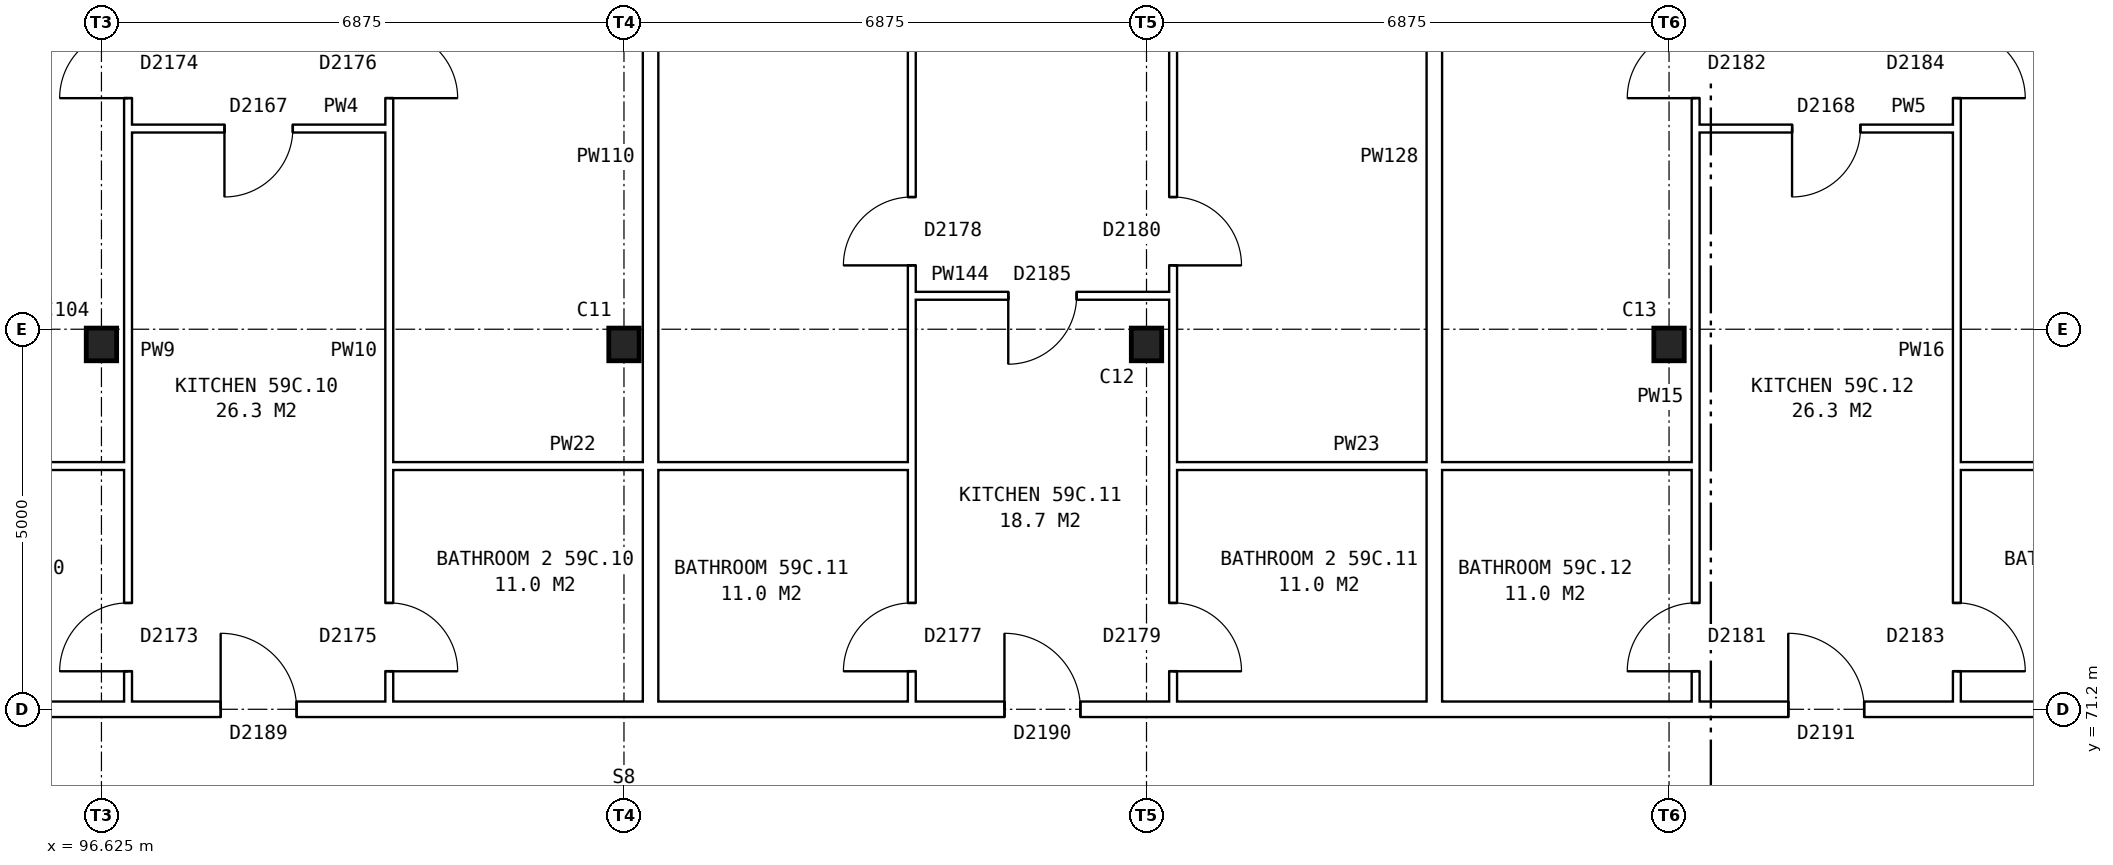
"""IFC4 building model, lengths in metres.
Left out: names, types, materials, properties, quantities, classifications, styles, units other than length and angle.
Written with IfcOpenShell. Run it as: python <this file> out.ifc"""

import sys

from ifc_helpers import new_model, si_unit, direction, frame, frame_2d, origin, origin_2d, place, context, subcontext, project, spatial, rectangle, i_section, extrude, element, fill, save


model = new_model("IFC4")
c1 = context("Model", 3, precision=1e-05, world=origin(), true_north=direction((0.0, 1.0)))
c2 = subcontext(c1, "Body", "Model", "MODEL_VIEW")
j1 = project(units=[si_unit("LENGTHUNIT", "METRE"), si_unit("PLANEANGLEUNIT", "RADIAN")], contexts=[c1])
p1 = place(None, origin())
s1 = spatial("IfcSite", under=j1, at=p1, CompositionType="ELEMENT")
p2 = place(p1, origin())
s2 = spatial("IfcBuilding", under=s1, at=p2, CompositionType="ELEMENT")
p3 = place(p2, frame((0.0, 0.0, 209.0)))
s3 = spatial("IfcBuildingStorey", under=s2, at=p3, CompositionType="ELEMENT", Elevation=209.0)
for number, where, z_axis, x_axis in (
    (1, (96.625, 76.0, 0.0), (0.0, 0.0, 1.0), (1.0, 0.0, 0.0)),
    (2, (103.5, 76.0, 0.0), (0.0, 0.0, 1.0), (1.0, 0.0, 0.0)),
    (3, (110.375, 76.0, 0.0), (0.0, 0.0, 1.0), (1.0, 0.0, 0.0)),
    (4, (117.25, 76.0, 0.0), (0.0, 0.0, 1.0), (1.0, 0.0, 0.0)),
):
    element("IfcColumn", number, at=place(p3, frame(where, z_axis=z_axis, x_axis=x_axis)), inside=s3, PredefinedType="COLUMN", context=c2, shape_type="SweptSolid", body=[
        extrude(i_section(OverallWidth=0.4, OverallDepth=0.43, WebThickness=0.04, FlangeThickness=0.04, at=origin_2d()), origin(), (0.0, 0.0, 1.0), 2.85),
    ])
p4 = place(p3, frame((83.225, 71.2, 0.0), z_axis=(0.0, 0.0, 1.0), x_axis=(1.0, 0.0, 0.0)))
e5 = element("IfcWall", 5, at=p4, inside=s3, PredefinedType="PARTITIONING", context=c2, shape_type="SweptSolid", body=[
    extrude(rectangle(XDim=41.25, YDim=0.2, at=frame_2d((20.625, 0.0))), origin(), (0.0, 0.0, 1.0), 2.85),
])
p5 = place(p4, frame((4.656, 0.0, 0.0)))
e6 = element("IfcOpeningElement", 6, at=p5, cuts=e5, PredefinedType="OPENING", context=c2, shape_type="SweptSolid", body=[
    extrude(rectangle(XDim=1.0, YDim=2.1, at=frame_2d((0.5, 1.05))), frame((0.0, 0.11, 0.0), z_axis=(0.0, -1.0, 0.0), x_axis=(1.0, 0.0, 0.0)), (0.0, 0.0, 1.0), 0.22),
])
p6 = place(p4, frame((14.969, 0.0, 0.0)))
e7 = element("IfcOpeningElement", 7, at=p6, cuts=e5, PredefinedType="OPENING", context=c2, shape_type="SweptSolid", body=[
    extrude(rectangle(XDim=1.0, YDim=2.1, at=frame_2d((0.5, 1.05))), frame((0.0, 0.11, 0.0), z_axis=(0.0, -1.0, 0.0), x_axis=(1.0, 0.0, 0.0)), (0.0, 0.0, 1.0), 0.22),
])
p7 = place(p4, frame((25.281, 0.0, 0.0)))
e8 = element("IfcOpeningElement", 8, at=p7, cuts=e5, PredefinedType="OPENING", context=c2, shape_type="SweptSolid", body=[
    extrude(rectangle(XDim=1.0, YDim=2.1, at=frame_2d((0.5, 1.05))), frame((0.0, 0.11, 0.0), z_axis=(0.0, -1.0, 0.0), x_axis=(1.0, 0.0, 0.0)), (0.0, 0.0, 1.0), 0.22),
])
p8 = place(p4, frame((35.594, 0.0, 0.0)))
e9 = element("IfcOpeningElement", 9, at=p8, cuts=e5, PredefinedType="OPENING", context=c2, shape_type="SweptSolid", body=[
    extrude(rectangle(XDim=1.0, YDim=2.1, at=frame_2d((0.5, 1.05))), frame((0.0, 0.11, 0.0), z_axis=(0.0, -1.0, 0.0), x_axis=(1.0, 0.0, 0.0)), (0.0, 0.0, 1.0), 0.22),
])
for number, where, z_axis, x_axis in (
    (10, (90.1, 74.4, 0.0), (0.0, 0.0, 1.0), (1.0, 0.0, 0.0)),
    (11, (100.412, 74.4, 0.0), (0.0, 0.0, 1.0), (1.0, 0.0, 0.0)),
    (12, (110.725, 74.4, 0.0), (0.0, 0.0, 1.0), (1.0, 0.0, 0.0)),
):
    element("IfcWall", number, at=place(p3, frame(where, z_axis=z_axis, x_axis=x_axis)), inside=s3, PredefinedType="PARTITIONING", context=c2, shape_type="SweptSolid", body=[
        extrude(rectangle(XDim=6.875, YDim=0.1, at=frame_2d((3.438, 0.0))), origin(), (0.0, 0.0, 1.0), 2.85),
    ])
p9 = place(p3, frame((121.037, 74.4, 0.0), z_axis=(0.0, 0.0, 1.0), x_axis=(1.0, 0.0, 0.0)))
e13 = element("IfcWall", 13, at=p9, inside=s3, PredefinedType="PARTITIONING", context=c2, shape_type="SweptSolid", body=[
    extrude(rectangle(XDim=3.338, YDim=0.1, at=frame_2d((1.669, 0.0))), origin(), (0.0, 0.0, 1.0), 2.85),
])
p10 = place(p3, frame((107.287, 76.64, 0.0), z_axis=(0.0, 0.0, 1.0), x_axis=(1.0, 0.0, 0.0)))
e14 = element("IfcWall", 14, at=p10, inside=s3, PredefinedType="PARTITIONING", context=c2, shape_type="SweptSolid", body=[
    extrude(rectangle(XDim=3.438, YDim=0.1, at=frame_2d((1.719, 0.0))), origin(), (0.0, 0.0, 1.0), 2.85),
])
p11 = place(p10, frame((1.269, 0.0, 0.0)))
e15 = element("IfcOpeningElement", 15, at=p11, cuts=e14, PredefinedType="OPENING", context=c2, shape_type="SweptSolid", body=[
    extrude(rectangle(XDim=0.9, YDim=2.1, at=frame_2d((0.45, 1.05))), frame((0.0, 0.06, 0.0), z_axis=(0.0, -1.0, 0.0), x_axis=(1.0, 0.0, 0.0)), (0.0, 0.0, 1.0), 0.12),
])
p12 = place(p3, frame((96.975, 78.84, 0.0), z_axis=(0.0, 0.0, 1.0), x_axis=(1.0, 0.0, 0.0)))
e16 = element("IfcWall", 16, at=p12, inside=s3, PredefinedType="PARTITIONING", context=c2, shape_type="SweptSolid", body=[
    extrude(rectangle(XDim=3.437, YDim=0.1, at=frame_2d((1.719, 0.0))), origin(), (0.0, 0.0, 1.0), 2.85),
])
p13 = place(p12, frame((1.269, 0.0, 0.0)))
e17 = element("IfcOpeningElement", 17, at=p13, cuts=e16, PredefinedType="OPENING", context=c2, shape_type="SweptSolid", body=[
    extrude(rectangle(XDim=0.9, YDim=2.1, at=frame_2d((0.45, 1.05))), frame((0.0, 0.06, 0.0), z_axis=(0.0, -1.0, 0.0), x_axis=(1.0, 0.0, 0.0)), (0.0, 0.0, 1.0), 0.12),
])
p14 = place(p3, frame((117.6, 78.84, 0.0), z_axis=(0.0, 0.0, 1.0), x_axis=(1.0, 0.0, 0.0)))
e18 = element("IfcWall", 18, at=p14, inside=s3, PredefinedType="PARTITIONING", context=c2, shape_type="SweptSolid", body=[
    extrude(rectangle(XDim=3.437, YDim=0.1, at=frame_2d((1.719, 0.0))), origin(), (0.0, 0.0, 1.0), 2.85),
])
p15 = place(p14, frame((1.269, 0.0, 0.0)))
e19 = element("IfcOpeningElement", 19, at=p15, cuts=e18, PredefinedType="OPENING", context=c2, shape_type="SweptSolid", body=[
    extrude(rectangle(XDim=0.9, YDim=2.1, at=frame_2d((0.45, 1.05))), frame((0.0, 0.06, 0.0), z_axis=(0.0, -1.0, 0.0), x_axis=(1.0, 0.0, 0.0)), (0.0, 0.0, 1.0), 0.12),
])
p16 = place(p3, frame((96.975, 71.3, 0.0), z_axis=(0.0, 0.0, 1.0), x_axis=(0.0, 1.0, 0.0)))
e20 = element("IfcWall", 20, at=p16, inside=s3, PredefinedType="PARTITIONING", context=c2, shape_type="SweptSolid", body=[
    extrude(rectangle(XDim=14.34, YDim=0.1, at=frame_2d((7.17, 0.0))), origin(), (0.0, 0.0, 1.0), 2.85),
])
p17 = place(p16, frame((7.94, 0.0, 0.0)))
e21 = element("IfcOpeningElement", 21, at=p17, cuts=e20, PredefinedType="OPENING", context=c2, shape_type="SweptSolid", body=[
    extrude(rectangle(XDim=0.9, YDim=2.1, at=frame_2d((0.45, 1.05))), frame((0.0, 0.06, 0.0), z_axis=(0.0, -1.0, 0.0), x_axis=(1.0, 0.0, 0.0)), (0.0, 0.0, 1.0), 0.12),
])
p18 = place(p16, frame((0.4, 0.0, 0.0)))
e22 = element("IfcOpeningElement", 22, at=p18, cuts=e20, PredefinedType="OPENING", context=c2, shape_type="SweptSolid", body=[
    extrude(rectangle(XDim=0.9, YDim=2.1, at=frame_2d((0.45, 1.05))), frame((0.0, 0.06, 0.0), z_axis=(0.0, -1.0, 0.0), x_axis=(1.0, 0.0, 0.0)), (0.0, 0.0, 1.0), 0.12),
])
p19 = place(p3, frame((100.412, 71.3, 0.0), z_axis=(0.0, 0.0, 1.0), x_axis=(0.0, 1.0, 0.0)))
e23 = element("IfcWall", 23, at=p19, inside=s3, PredefinedType="PARTITIONING", context=c2, shape_type="SweptSolid", body=[
    extrude(rectangle(XDim=14.34, YDim=0.1, at=frame_2d((7.17, 0.0))), origin(), (0.0, 0.0, 1.0), 2.85),
])
p20 = place(p19, frame((7.94, 0.0, 0.0)))
e24 = element("IfcOpeningElement", 24, at=p20, cuts=e23, PredefinedType="OPENING", context=c2, shape_type="SweptSolid", body=[
    extrude(rectangle(XDim=0.9, YDim=2.1, at=frame_2d((0.45, 1.05))), frame((0.0, 0.06, 0.0), z_axis=(0.0, -1.0, 0.0), x_axis=(1.0, 0.0, 0.0)), (0.0, 0.0, 1.0), 0.12),
])
p21 = place(p19, frame((0.4, 0.0, 0.0)))
e25 = element("IfcOpeningElement", 25, at=p21, cuts=e23, PredefinedType="OPENING", context=c2, shape_type="SweptSolid", body=[
    extrude(rectangle(XDim=0.9, YDim=2.1, at=frame_2d((0.45, 1.05))), frame((0.0, 0.06, 0.0), z_axis=(0.0, -1.0, 0.0), x_axis=(1.0, 0.0, 0.0)), (0.0, 0.0, 1.0), 0.12),
])
p22 = place(p3, frame((103.85, 71.3, 0.0), z_axis=(0.0, 0.0, 1.0), x_axis=(0.0, 1.0, 0.0)))
e26 = element("IfcWall", 26, at=p22, inside=s3, PredefinedType="PARTITIONING", context=c2, shape_type="SweptSolid", body=[
    extrude(rectangle(XDim=14.34, YDim=0.2, at=frame_2d((7.17, 0.0))), origin(), (0.0, 0.0, 1.0), 2.85),
])
p23 = place(p3, frame((107.287, 71.3, 0.0), z_axis=(0.0, 0.0, 1.0), x_axis=(0.0, 1.0, 0.0)))
e27 = element("IfcWall", 27, at=p23, inside=s3, PredefinedType="PARTITIONING", context=c2, shape_type="SweptSolid", body=[
    extrude(rectangle(XDim=14.34, YDim=0.1, at=frame_2d((7.17, 0.0))), origin(), (0.0, 0.0, 1.0), 2.85),
])
p24 = place(p23, frame((5.74, 0.0, 0.0)))
e28 = element("IfcOpeningElement", 28, at=p24, cuts=e27, PredefinedType="OPENING", context=c2, shape_type="SweptSolid", body=[
    extrude(rectangle(XDim=0.9, YDim=2.1, at=frame_2d((0.45, 1.05))), frame((0.0, 0.06, 0.0), z_axis=(0.0, -1.0, 0.0), x_axis=(1.0, 0.0, 0.0)), (0.0, 0.0, 1.0), 0.12),
])
p25 = place(p23, frame((0.4, 0.0, 0.0)))
e29 = element("IfcOpeningElement", 29, at=p25, cuts=e27, PredefinedType="OPENING", context=c2, shape_type="SweptSolid", body=[
    extrude(rectangle(XDim=0.9, YDim=2.1, at=frame_2d((0.45, 1.05))), frame((0.0, 0.06, 0.0), z_axis=(0.0, -1.0, 0.0), x_axis=(1.0, 0.0, 0.0)), (0.0, 0.0, 1.0), 0.12),
])
p26 = place(p3, frame((110.725, 71.3, 0.0), z_axis=(0.0, 0.0, 1.0), x_axis=(0.0, 1.0, 0.0)))
e30 = element("IfcWall", 30, at=p26, inside=s3, PredefinedType="PARTITIONING", context=c2, shape_type="SweptSolid", body=[
    extrude(rectangle(XDim=14.34, YDim=0.1, at=frame_2d((7.17, 0.0))), origin(), (0.0, 0.0, 1.0), 2.85),
])
p27 = place(p26, frame((5.74, 0.0, 0.0)))
e31 = element("IfcOpeningElement", 31, at=p27, cuts=e30, PredefinedType="OPENING", context=c2, shape_type="SweptSolid", body=[
    extrude(rectangle(XDim=0.9, YDim=2.1, at=frame_2d((0.45, 1.05))), frame((0.0, 0.06, 0.0), z_axis=(0.0, -1.0, 0.0), x_axis=(1.0, 0.0, 0.0)), (0.0, 0.0, 1.0), 0.12),
])
p28 = place(p26, frame((0.4, 0.0, 0.0)))
e32 = element("IfcOpeningElement", 32, at=p28, cuts=e30, PredefinedType="OPENING", context=c2, shape_type="SweptSolid", body=[
    extrude(rectangle(XDim=0.9, YDim=2.1, at=frame_2d((0.45, 1.05))), frame((0.0, 0.06, 0.0), z_axis=(0.0, -1.0, 0.0), x_axis=(1.0, 0.0, 0.0)), (0.0, 0.0, 1.0), 0.12),
])
p29 = place(p3, frame((114.162, 71.3, 0.0), z_axis=(0.0, 0.0, 1.0), x_axis=(0.0, 1.0, 0.0)))
e33 = element("IfcWall", 33, at=p29, inside=s3, PredefinedType="PARTITIONING", context=c2, shape_type="SweptSolid", body=[
    extrude(rectangle(XDim=14.34, YDim=0.2, at=frame_2d((7.17, 0.0))), origin(), (0.0, 0.0, 1.0), 2.85),
])
p30 = place(p3, frame((117.6, 71.3, 0.0), z_axis=(0.0, 0.0, 1.0), x_axis=(0.0, 1.0, 0.0)))
e34 = element("IfcWall", 34, at=p30, inside=s3, PredefinedType="PARTITIONING", context=c2, shape_type="SweptSolid", body=[
    extrude(rectangle(XDim=14.34, YDim=0.1, at=frame_2d((7.17, 0.0))), origin(), (0.0, 0.0, 1.0), 2.85),
])
p31 = place(p30, frame((7.94, 0.0, 0.0)))
e35 = element("IfcOpeningElement", 35, at=p31, cuts=e34, PredefinedType="OPENING", context=c2, shape_type="SweptSolid", body=[
    extrude(rectangle(XDim=0.9, YDim=2.1, at=frame_2d((0.45, 1.05))), frame((0.0, 0.06, 0.0), z_axis=(0.0, -1.0, 0.0), x_axis=(1.0, 0.0, 0.0)), (0.0, 0.0, 1.0), 0.12),
])
p32 = place(p30, frame((0.4, 0.0, 0.0)))
e36 = element("IfcOpeningElement", 36, at=p32, cuts=e34, PredefinedType="OPENING", context=c2, shape_type="SweptSolid", body=[
    extrude(rectangle(XDim=0.9, YDim=2.1, at=frame_2d((0.45, 1.05))), frame((0.0, 0.06, 0.0), z_axis=(0.0, -1.0, 0.0), x_axis=(1.0, 0.0, 0.0)), (0.0, 0.0, 1.0), 0.12),
])
p33 = place(p3, frame((121.037, 71.3, 0.0), z_axis=(0.0, 0.0, 1.0), x_axis=(0.0, 1.0, 0.0)))
e37 = element("IfcWall", 37, at=p33, inside=s3, PredefinedType="PARTITIONING", context=c2, shape_type="SweptSolid", body=[
    extrude(rectangle(XDim=14.34, YDim=0.1, at=frame_2d((7.17, 0.0))), origin(), (0.0, 0.0, 1.0), 2.85),
])
p34 = place(p33, frame((7.94, 0.0, 0.0)))
e38 = element("IfcOpeningElement", 38, at=p34, cuts=e37, PredefinedType="OPENING", context=c2, shape_type="SweptSolid", body=[
    extrude(rectangle(XDim=0.9, YDim=2.1, at=frame_2d((0.45, 1.05))), frame((0.0, 0.06, 0.0), z_axis=(0.0, -1.0, 0.0), x_axis=(1.0, 0.0, 0.0)), (0.0, 0.0, 1.0), 0.12),
])
p35 = place(p33, frame((0.4, 0.0, 0.0)))
e39 = element("IfcOpeningElement", 39, at=p35, cuts=e37, PredefinedType="OPENING", context=c2, shape_type="SweptSolid", body=[
    extrude(rectangle(XDim=0.9, YDim=2.1, at=frame_2d((0.45, 1.05))), frame((0.0, 0.06, 0.0), z_axis=(0.0, -1.0, 0.0), x_axis=(1.0, 0.0, 0.0)), (0.0, 0.0, 1.0), 0.12),
])
p36 = place(p17, origin())
e40 = element("IfcDoor", 40, at=p36, inside=s3, OperationType="SINGLE_SWING_LEFT", PredefinedType="DOOR", context=c2, shape_type="SweptSolid", body=[
    extrude(rectangle(XDim=0.9, YDim=2.1, at=frame_2d((0.45, 1.05))), frame((0.0, 0.025, 0.0), z_axis=(0.0, -1.0, 0.0), x_axis=(1.0, 0.0, 0.0)), (0.0, 0.0, 1.0), 0.05),
])
fill(e21, e40)
p37 = place(p20, frame((0.9, 0.0, 0.0), z_axis=(0.0, 0.0, 1.0), x_axis=(-1.0, 0.0, 0.0)))
e41 = element("IfcDoor", 41, at=p37, inside=s3, OperationType="SINGLE_SWING_RIGHT", PredefinedType="DOOR", context=c2, shape_type="SweptSolid", body=[
    extrude(rectangle(XDim=0.9, YDim=2.1, at=frame_2d((0.45, 1.05))), frame((0.0, 0.025, 0.0), z_axis=(0.0, -1.0, 0.0), x_axis=(1.0, 0.0, 0.0)), (0.0, 0.0, 1.0), 0.05),
])
fill(e24, e41)
p38 = place(p6, origin())
e42 = element("IfcDoor", 42, at=p38, inside=s3, OperationType="SINGLE_SWING_LEFT", PredefinedType="DOOR", context=c2, shape_type="SweptSolid", body=[
    extrude(rectangle(XDim=1.0, YDim=2.1, at=frame_2d((0.5, 1.05))), frame((0.0, 0.025, 0.0), z_axis=(0.0, -1.0, 0.0), x_axis=(1.0, 0.0, 0.0)), (0.0, 0.0, 1.0), 0.05),
])
fill(e7, e42)
p39 = place(p13, frame((0.9, 0.0, 0.0), z_axis=(0.0, 0.0, 1.0), x_axis=(-1.0, 0.0, 0.0)))
e43 = element("IfcDoor", 43, at=p39, inside=s3, OperationType="SINGLE_SWING_RIGHT", PredefinedType="DOOR", context=c2, shape_type="SweptSolid", body=[
    extrude(rectangle(XDim=0.9, YDim=2.1, at=frame_2d((0.45, 1.05))), frame((0.0, 0.025, 0.0), z_axis=(0.0, -1.0, 0.0), x_axis=(1.0, 0.0, 0.0)), (0.0, 0.0, 1.0), 0.05),
])
fill(e17, e43)
p40 = place(p18, origin())
e44 = element("IfcDoor", 44, at=p40, inside=s3, OperationType="SINGLE_SWING_LEFT", PredefinedType="DOOR", context=c2, shape_type="SweptSolid", body=[
    extrude(rectangle(XDim=0.9, YDim=2.1, at=frame_2d((0.45, 1.05))), frame((0.0, 0.025, 0.0), z_axis=(0.0, -1.0, 0.0), x_axis=(1.0, 0.0, 0.0)), (0.0, 0.0, 1.0), 0.05),
])
fill(e22, e44)
p41 = place(p21, frame((0.9, 0.0, 0.0), z_axis=(0.0, 0.0, 1.0), x_axis=(-1.0, 0.0, 0.0)))
e45 = element("IfcDoor", 45, at=p41, inside=s3, OperationType="SINGLE_SWING_RIGHT", PredefinedType="DOOR", context=c2, shape_type="SweptSolid", body=[
    extrude(rectangle(XDim=0.9, YDim=2.1, at=frame_2d((0.45, 1.05))), frame((0.0, 0.025, 0.0), z_axis=(0.0, -1.0, 0.0), x_axis=(1.0, 0.0, 0.0)), (0.0, 0.0, 1.0), 0.05),
])
fill(e25, e45)
p42 = place(p24, origin())
e46 = element("IfcDoor", 46, at=p42, inside=s3, OperationType="SINGLE_SWING_LEFT", PredefinedType="DOOR", context=c2, shape_type="SweptSolid", body=[
    extrude(rectangle(XDim=0.9, YDim=2.1, at=frame_2d((0.45, 1.05))), frame((0.0, 0.025, 0.0), z_axis=(0.0, -1.0, 0.0), x_axis=(1.0, 0.0, 0.0)), (0.0, 0.0, 1.0), 0.05),
])
fill(e28, e46)
p43 = place(p27, frame((0.9, 0.0, 0.0), z_axis=(0.0, 0.0, 1.0), x_axis=(-1.0, 0.0, 0.0)))
e47 = element("IfcDoor", 47, at=p43, inside=s3, OperationType="SINGLE_SWING_RIGHT", PredefinedType="DOOR", context=c2, shape_type="SweptSolid", body=[
    extrude(rectangle(XDim=0.9, YDim=2.1, at=frame_2d((0.45, 1.05))), frame((0.0, 0.025, 0.0), z_axis=(0.0, -1.0, 0.0), x_axis=(1.0, 0.0, 0.0)), (0.0, 0.0, 1.0), 0.05),
])
fill(e31, e47)
p44 = place(p7, origin())
e48 = element("IfcDoor", 48, at=p44, inside=s3, OperationType="SINGLE_SWING_LEFT", PredefinedType="DOOR", context=c2, shape_type="SweptSolid", body=[
    extrude(rectangle(XDim=1.0, YDim=2.1, at=frame_2d((0.5, 1.05))), frame((0.0, 0.025, 0.0), z_axis=(0.0, -1.0, 0.0), x_axis=(1.0, 0.0, 0.0)), (0.0, 0.0, 1.0), 0.05),
])
fill(e8, e48)
p45 = place(p11, frame((0.9, 0.0, 0.0), z_axis=(0.0, 0.0, 1.0), x_axis=(-1.0, 0.0, 0.0)))
e49 = element("IfcDoor", 49, at=p45, inside=s3, OperationType="SINGLE_SWING_RIGHT", PredefinedType="DOOR", context=c2, shape_type="SweptSolid", body=[
    extrude(rectangle(XDim=0.9, YDim=2.1, at=frame_2d((0.45, 1.05))), frame((0.0, 0.025, 0.0), z_axis=(0.0, -1.0, 0.0), x_axis=(1.0, 0.0, 0.0)), (0.0, 0.0, 1.0), 0.05),
])
fill(e15, e49)
p46 = place(p25, origin())
e50 = element("IfcDoor", 50, at=p46, inside=s3, OperationType="SINGLE_SWING_LEFT", PredefinedType="DOOR", context=c2, shape_type="SweptSolid", body=[
    extrude(rectangle(XDim=0.9, YDim=2.1, at=frame_2d((0.45, 1.05))), frame((0.0, 0.025, 0.0), z_axis=(0.0, -1.0, 0.0), x_axis=(1.0, 0.0, 0.0)), (0.0, 0.0, 1.0), 0.05),
])
fill(e29, e50)
p47 = place(p28, frame((0.9, 0.0, 0.0), z_axis=(0.0, 0.0, 1.0), x_axis=(-1.0, 0.0, 0.0)))
e51 = element("IfcDoor", 51, at=p47, inside=s3, OperationType="SINGLE_SWING_RIGHT", PredefinedType="DOOR", context=c2, shape_type="SweptSolid", body=[
    extrude(rectangle(XDim=0.9, YDim=2.1, at=frame_2d((0.45, 1.05))), frame((0.0, 0.025, 0.0), z_axis=(0.0, -1.0, 0.0), x_axis=(1.0, 0.0, 0.0)), (0.0, 0.0, 1.0), 0.05),
])
fill(e32, e51)
p48 = place(p31, origin())
e52 = element("IfcDoor", 52, at=p48, inside=s3, OperationType="SINGLE_SWING_LEFT", PredefinedType="DOOR", context=c2, shape_type="SweptSolid", body=[
    extrude(rectangle(XDim=0.9, YDim=2.1, at=frame_2d((0.45, 1.05))), frame((0.0, 0.025, 0.0), z_axis=(0.0, -1.0, 0.0), x_axis=(1.0, 0.0, 0.0)), (0.0, 0.0, 1.0), 0.05),
])
fill(e35, e52)
p49 = place(p34, frame((0.9, 0.0, 0.0), z_axis=(0.0, 0.0, 1.0), x_axis=(-1.0, 0.0, 0.0)))
e53 = element("IfcDoor", 53, at=p49, inside=s3, OperationType="SINGLE_SWING_RIGHT", PredefinedType="DOOR", context=c2, shape_type="SweptSolid", body=[
    extrude(rectangle(XDim=0.9, YDim=2.1, at=frame_2d((0.45, 1.05))), frame((0.0, 0.025, 0.0), z_axis=(0.0, -1.0, 0.0), x_axis=(1.0, 0.0, 0.0)), (0.0, 0.0, 1.0), 0.05),
])
fill(e38, e53)
p50 = place(p8, origin())
e54 = element("IfcDoor", 54, at=p50, inside=s3, OperationType="SINGLE_SWING_LEFT", PredefinedType="DOOR", context=c2, shape_type="SweptSolid", body=[
    extrude(rectangle(XDim=1.0, YDim=2.1, at=frame_2d((0.5, 1.05))), frame((0.0, 0.025, 0.0), z_axis=(0.0, -1.0, 0.0), x_axis=(1.0, 0.0, 0.0)), (0.0, 0.0, 1.0), 0.05),
])
fill(e9, e54)
p51 = place(p15, frame((0.9, 0.0, 0.0), z_axis=(0.0, 0.0, 1.0), x_axis=(-1.0, 0.0, 0.0)))
e55 = element("IfcDoor", 55, at=p51, inside=s3, OperationType="SINGLE_SWING_RIGHT", PredefinedType="DOOR", context=c2, shape_type="SweptSolid", body=[
    extrude(rectangle(XDim=0.9, YDim=2.1, at=frame_2d((0.45, 1.05))), frame((0.0, 0.025, 0.0), z_axis=(0.0, -1.0, 0.0), x_axis=(1.0, 0.0, 0.0)), (0.0, 0.0, 1.0), 0.05),
])
fill(e19, e55)
p52 = place(p32, origin())
e56 = element("IfcDoor", 56, at=p52, inside=s3, OperationType="SINGLE_SWING_LEFT", PredefinedType="DOOR", context=c2, shape_type="SweptSolid", body=[
    extrude(rectangle(XDim=0.9, YDim=2.1, at=frame_2d((0.45, 1.05))), frame((0.0, 0.025, 0.0), z_axis=(0.0, -1.0, 0.0), x_axis=(1.0, 0.0, 0.0)), (0.0, 0.0, 1.0), 0.05),
])
fill(e36, e56)
p53 = place(p35, frame((0.9, 0.0, 0.0), z_axis=(0.0, 0.0, 1.0), x_axis=(-1.0, 0.0, 0.0)))
e57 = element("IfcDoor", 57, at=p53, inside=s3, OperationType="SINGLE_SWING_RIGHT", PredefinedType="DOOR", context=c2, shape_type="SweptSolid", body=[
    extrude(rectangle(XDim=0.9, YDim=2.1, at=frame_2d((0.45, 1.05))), frame((0.0, 0.025, 0.0), z_axis=(0.0, -1.0, 0.0), x_axis=(1.0, 0.0, 0.0)), (0.0, 0.0, 1.0), 0.05),
])
fill(e39, e57)
save(model, sys.argv[1])
